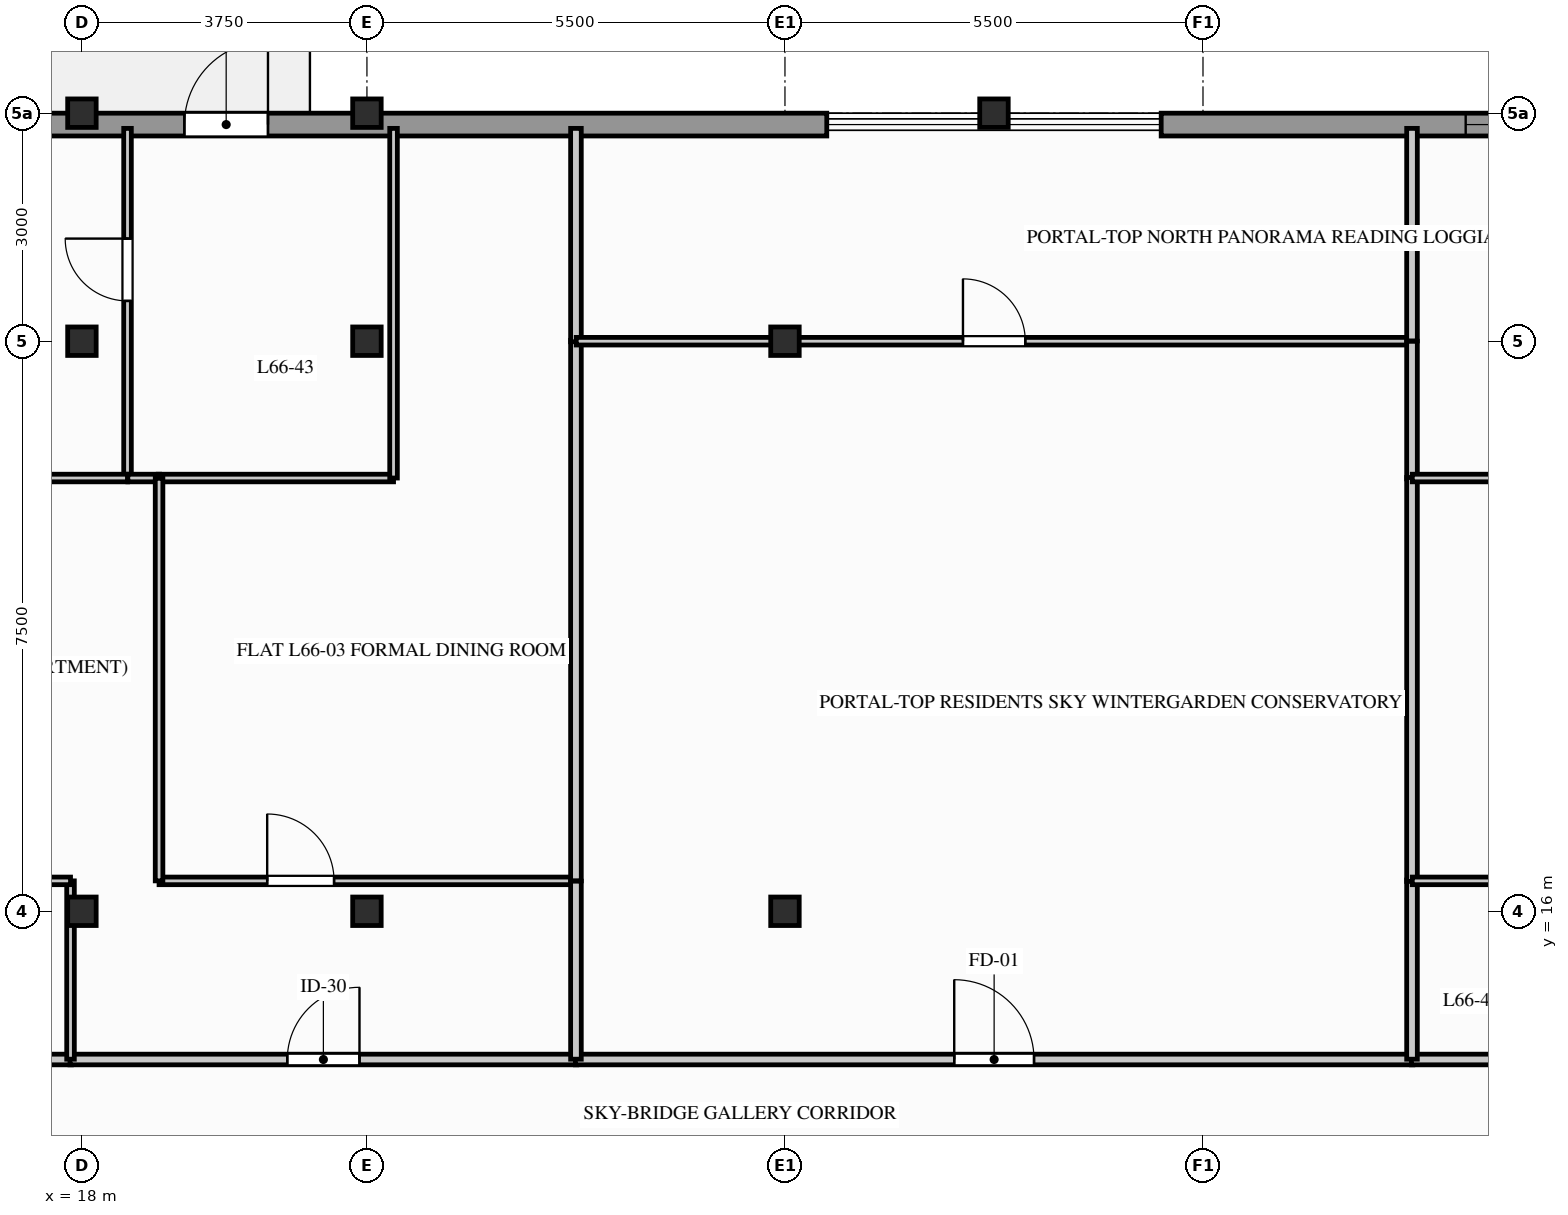
"""IFC4 building model, lengths in metres.
Left out: names, types, materials, properties, quantities, classifications, styles, units other than length and angle.
Written with IfcOpenShell. Run it as: python <this file> out.ifc"""

import sys

from ifc_helpers import new_model, si_unit, direction, frame, frame_2d, origin, origin_2d, place, context, subcontext, project, spatial, rectangle, i_section, extrude, element, fill, save


model = new_model("IFC4")
c1 = context("Model", 3, precision=1e-05, world=origin(), true_north=direction((0.0, 1.0)))
c2 = subcontext(c1, "Body", "Model", "MODEL_VIEW")
j1 = project(units=[si_unit("LENGTHUNIT", "METRE"), si_unit("PLANEANGLEUNIT", "RADIAN")], contexts=[c1])
p1 = place(None, origin())
s1 = spatial("IfcSite", under=j1, at=p1, CompositionType="ELEMENT")
p2 = place(p1, origin())
s2 = spatial("IfcBuilding", under=s1, at=p2, CompositionType="ELEMENT")
p3 = place(p2, frame((0.0, 0.0, 218.0)))
s3 = spatial("IfcBuildingStorey", under=s2, at=p3, CompositionType="ELEMENT", Elevation=218.0)
for number, where, z_axis, x_axis in (
    (1, (18.0, 16.0, 0.0), (0.0, 0.0, 1.0), (1.0, 0.0, 0.0)),
    (2, (18.0, 23.5, 0.0), (0.0, 0.0, 1.0), (1.0, 0.0, 0.0)),
    (3, (18.0, 26.5, 0.0), (0.0, 0.0, 1.0), (1.0, 0.0, 0.0)),
    (4, (21.75, 16.0, 0.0), (0.0, 0.0, 1.0), (1.0, 0.0, 0.0)),
    (5, (21.75, 23.5, 0.0), (0.0, 0.0, 1.0), (1.0, 0.0, 0.0)),
    (6, (21.75, 26.5, 0.0), (0.0, 0.0, 1.0), (1.0, 0.0, 0.0)),
    (7, (27.25, 16.0, 0.0), (0.0, 0.0, 1.0), (1.0, 0.0, 0.0)),
    (8, (27.25, 23.5, 0.0), (0.0, 0.0, 1.0), (1.0, 0.0, 0.0)),
    (9, (30.0, 26.5, 0.0), (0.0, 0.0, 1.0), (1.0, 0.0, 0.0)),
):
    element("IfcColumn", number, at=place(p3, frame(where, z_axis=z_axis, x_axis=x_axis)), inside=s3, PredefinedType="COLUMN", context=c2, shape_type="SweptSolid", body=[
        extrude(i_section(OverallWidth=0.375, OverallDepth=0.375, WebThickness=0.017, FlangeThickness=0.027, FilletRadius=0.015, at=origin_2d()), origin(), (0.0, 0.0, 1.0), 3.1),
    ])
p4 = place(p3, frame((11.45, 26.35, 0.0), z_axis=(0.0, 0.0, 1.0), x_axis=(1.0, 0.0, 0.0)))
e10 = element("IfcWall", 10, at=p4, inside=s3, PredefinedType="STANDARD", context=c2, shape_type="SweptSolid", body=[
    extrude(rectangle(XDim=16.35, YDim=0.3, at=frame_2d((8.175, 0.0))), origin(), (0.0, 0.0, 1.0), 2.332),
])
p5 = place(p4, frame((7.898, 0.0, 0.0)))
e11 = element("IfcOpeningElement", 11, at=p5, cuts=e10, PredefinedType="OPENING", context=c2, shape_type="SweptSolid", body=[
    extrude(rectangle(XDim=1.1, YDim=2.2, at=frame_2d((0.55, 1.1))), frame((0.0, 0.16, 0.0), z_axis=(0.0, -1.0, 0.0), x_axis=(1.0, 0.0, 0.0)), (0.0, 0.0, 1.0), 0.32),
])
p6 = place(p4, frame((1.8, 0.0, 0.512)))
e12 = element("IfcOpeningElement", 12, at=p6, cuts=e10, PredefinedType="OPENING", context=c2, shape_type="SweptSolid", body=[
    extrude(rectangle(XDim=1.2, YDim=1.6, at=frame_2d((0.6, 0.8))), frame((0.0, 0.16, 0.0), z_axis=(0.0, -1.0, 0.0), x_axis=(1.0, 0.0, 0.0)), (0.0, 0.0, 1.0), 0.32),
])
p7 = place(p4, frame((4.421, 0.0, 0.512)))
e13 = element("IfcOpeningElement", 13, at=p7, cuts=e10, PredefinedType="OPENING", context=c2, shape_type="SweptSolid", body=[
    extrude(rectangle(XDim=1.2, YDim=1.6, at=frame_2d((0.6, 0.8))), frame((0.0, 0.16, 0.0), z_axis=(0.0, -1.0, 0.0), x_axis=(1.0, 0.0, 0.0)), (0.0, 0.0, 1.0), 0.32),
])
p8 = place(p3, frame((32.2, 26.35, 0.0), z_axis=(0.0, 0.0, 1.0), x_axis=(1.0, 0.0, 0.0)))
e14 = element("IfcWall", 14, at=p8, inside=s3, PredefinedType="STANDARD", context=c2, shape_type="SweptSolid", body=[
    extrude(rectangle(XDim=16.35, YDim=0.3, at=frame_2d((8.175, 0.0))), origin(), (0.0, 0.0, 1.0), 2.332),
])
p9 = place(p8, frame((7.6, 0.0, 0.0)))
e15 = element("IfcOpeningElement", 15, at=p9, cuts=e14, PredefinedType="OPENING", context=c2, shape_type="SweptSolid", body=[
    extrude(rectangle(XDim=1.1, YDim=2.2, at=frame_2d((0.55, 1.1))), frame((0.0, 0.16, 0.0), z_axis=(0.0, -1.0, 0.0), x_axis=(1.0, 0.0, 0.0)), (0.0, 0.0, 1.0), 0.32),
])
p10 = place(p8, frame((11.5, 0.0, 0.512)))
e16 = element("IfcOpeningElement", 16, at=p10, cuts=e14, PredefinedType="OPENING", context=c2, shape_type="SweptSolid", body=[
    extrude(rectangle(XDim=1.2, YDim=1.6, at=frame_2d((0.6, 0.8))), frame((0.0, 0.16, 0.0), z_axis=(0.0, -1.0, 0.0), x_axis=(1.0, 0.0, 0.0)), (0.0, 0.0, 1.0), 0.32),
])
p11 = place(p8, frame((4.006, 0.0, 0.512)))
e17 = element("IfcOpeningElement", 17, at=p11, cuts=e14, PredefinedType="OPENING", context=c2, shape_type="SweptSolid", body=[
    extrude(rectangle(XDim=1.2, YDim=1.6, at=frame_2d((0.6, 0.8))), frame((0.0, 0.16, 0.0), z_axis=(0.0, -1.0, 0.0), x_axis=(1.0, 0.0, 0.0)), (0.0, 0.0, 1.0), 0.32),
])
p12 = place(p3, frame((14.643, 14.05, 0.0), z_axis=(0.0, 0.0, 1.0), x_axis=(1.0, 0.0, 0.0)))
e18 = element("IfcWall", 18, at=p12, inside=s3, PredefinedType="PARTITIONING", context=c2, shape_type="SweptSolid", body=[
    extrude(rectangle(XDim=3.219, YDim=0.14, at=frame_2d((1.609, 0.0))), origin(), (0.0, 0.0, 1.0), 2.89),
])
p13 = place(p3, frame((17.843, 14.05, 0.0), z_axis=(0.0, 0.0, 1.0), x_axis=(1.0, 0.0, 0.0)))
e19 = element("IfcWall", 19, at=p13, inside=s3, PredefinedType="PARTITIONING", context=c2, shape_type="SweptSolid", body=[
    extrude(rectangle(XDim=6.668, YDim=0.14, at=frame_2d((3.334, 0.0))), origin(), (0.0, 0.0, 1.0), 2.325),
])
p14 = place(p13, frame((2.859, 0.0, 0.0)))
e20 = element("IfcOpeningElement", 20, at=p14, cuts=e19, PredefinedType="OPENING", context=c2, shape_type="SweptSolid", body=[
    extrude(rectangle(XDim=0.95, YDim=2.05, at=frame_2d((0.475, 1.025))), frame((0.0, 0.08, 0.0), z_axis=(0.0, -1.0, 0.0), x_axis=(1.0, 0.0, 0.0)), (0.0, 0.0, 1.0), 0.16),
])
p15 = place(p3, frame((24.493, 14.05, 0.0), z_axis=(0.0, 0.0, 1.0), x_axis=(1.0, 0.0, 0.0)))
e21 = element("IfcWall", 21, at=p15, inside=s3, PredefinedType="PARTITIONING", context=c2, shape_type="SweptSolid", body=[
    extrude(rectangle(XDim=11.019, YDim=0.14, at=frame_2d((5.509, 0.0))), origin(), (0.0, 0.0, 1.0), 2.332),
])
p16 = place(p15, frame((4.984, 0.0, 0.0)))
e22 = element("IfcOpeningElement", 22, at=p16, cuts=e21, PredefinedType="OPENING", context=c2, shape_type="SweptSolid", body=[
    extrude(rectangle(XDim=1.05, YDim=2.06, at=frame_2d((0.525, 1.03))), frame((0.0, 0.08, 0.0), z_axis=(0.0, -1.0, 0.0), x_axis=(1.0, 0.0, 0.0)), (0.0, 0.0, 1.0), 0.16),
])
p17 = place(p3, frame((35.493, 14.05, 0.0), z_axis=(0.0, 0.0, 1.0), x_axis=(1.0, 0.0, 0.0)))
e23 = element("IfcWall", 23, at=p17, inside=s3, PredefinedType="PARTITIONING", context=c2, shape_type="SweptSolid", body=[
    extrude(rectangle(XDim=3.069, YDim=0.14, at=frame_2d((1.534, 0.0))), origin(), (0.0, 0.0, 1.0), 2.325),
])
p18 = place(p3, frame((17.85, 14.054, 0.0), z_axis=(0.0, 0.0, 1.0), x_axis=(0.0, 1.0, 0.0)))
e24 = element("IfcWall", 24, at=p18, inside=s3, PredefinedType="PARTITIONING", context=c2, shape_type="SweptSolid", body=[
    extrude(rectangle(XDim=2.346, YDim=0.1, at=frame_2d((1.173, 0.0))), origin(), (0.0, 0.0, 1.0), 2.325),
])
p19 = place(p3, frame((14.654, 16.4, 0.0), z_axis=(0.0, 0.0, 1.0), x_axis=(1.0, 0.0, 0.0)))
e25 = element("IfcWall", 25, at=p19, inside=s3, PredefinedType="PARTITIONING", context=c2, shape_type="SweptSolid", body=[
    extrude(rectangle(XDim=3.196, YDim=0.1, at=frame_2d((1.598, 0.0))), origin(), (0.0, 0.0, 1.0), 2.89),
])
p20 = place(p19, frame((1.158, 0.0, 0.0)))
e26 = element("IfcOpeningElement", 26, at=p20, cuts=e25, PredefinedType="OPENING", context=c2, shape_type="SweptSolid", body=[
    extrude(rectangle(XDim=0.88, YDim=2.04, at=frame_2d((0.44, 1.02))), frame((0.0, 0.06, 0.0), z_axis=(0.0, -1.0, 0.0), x_axis=(1.0, 0.0, 0.0)), (0.0, 0.0, 1.0), 0.12),
])
p21 = place(p3, frame((18.6, 21.7, 0.0), z_axis=(0.0, 0.0, 1.0), x_axis=(0.0, 1.0, 0.0)))
e27 = element("IfcWall", 27, at=p21, inside=s3, PredefinedType="PARTITIONING", context=c2, shape_type="SweptSolid", body=[
    extrude(rectangle(XDim=4.6, YDim=0.1, at=frame_2d((2.3, 0.0))), origin(), (0.0, 0.0, 1.0), 2.325),
])
p22 = place(p21, frame((2.33, 0.0, 0.0)))
e28 = element("IfcOpeningElement", 28, at=p22, cuts=e27, PredefinedType="OPENING", context=c2, shape_type="SweptSolid", body=[
    extrude(rectangle(XDim=0.82, YDim=2.02, at=frame_2d((0.41, 1.01))), frame((0.0, 0.06, 0.0), z_axis=(0.0, -1.0, 0.0), x_axis=(1.0, 0.0, 0.0)), (0.0, 0.0, 1.0), 0.12),
])
p23 = place(p3, frame((15.104, 21.7, 0.0), z_axis=(0.0, 0.0, 1.0), x_axis=(1.0, 0.0, 0.0)))
e29 = element("IfcWall", 29, at=p23, inside=s3, PredefinedType="PARTITIONING", context=c2, shape_type="SweptSolid", body=[
    extrude(rectangle(XDim=3.496, YDim=0.1, at=frame_2d((1.748, 0.0))), origin(), (0.0, 0.0, 1.0), 2.325),
])
p24 = place(p23, frame((1.308, 0.0, 0.0)))
e30 = element("IfcOpeningElement", 30, at=p24, cuts=e29, PredefinedType="OPENING", context=c2, shape_type="SweptSolid", body=[
    extrude(rectangle(XDim=0.88, YDim=2.04, at=frame_2d((0.44, 1.02))), frame((0.0, 0.06, 0.0), z_axis=(0.0, -1.0, 0.0), x_axis=(1.0, 0.0, 0.0)), (0.0, 0.0, 1.0), 0.12),
])
p25 = place(p3, frame((19.004, 21.7, 0.0), z_axis=(0.0, 0.0, 1.0), x_axis=(1.0, 0.0, 0.0)))
e31 = element("IfcWall", 31, at=p25, inside=s3, PredefinedType="PARTITIONING", context=c2, shape_type="SweptSolid", body=[
    extrude(rectangle(XDim=3.096, YDim=0.1, at=frame_2d((1.548, 0.0))), origin(), (0.0, 0.0, 1.0), 2.325),
])
p26 = place(p3, frame((22.1, 21.7, 0.0), z_axis=(0.0, 0.0, 1.0), x_axis=(0.0, 1.0, 0.0)))
e32 = element("IfcWall", 32, at=p26, inside=s3, PredefinedType="PARTITIONING", context=c2, shape_type="SweptSolid", body=[
    extrude(rectangle(XDim=4.6, YDim=0.1, at=frame_2d((2.3, 0.0))), origin(), (0.0, 0.0, 1.0), 2.325),
])
p27 = place(p3, frame((18.604, 21.7, 0.0), z_axis=(0.0, 0.0, 1.0), x_axis=(1.0, 0.0, 0.0)))
e33 = element("IfcWall", 33, at=p27, inside=s3, PredefinedType="PARTITIONING", context=c2, shape_type="SweptSolid", body=[
    extrude(rectangle(XDim=0.418, YDim=0.1, at=frame_2d((0.209, 0.0))), origin(), (0.0, 0.0, 1.0), 2.89),
])
p28 = place(p3, frame((19.015, 16.4, 0.0), z_axis=(0.0, 0.0, 1.0), x_axis=(1.0, 0.0, 0.0)))
e34 = element("IfcWall", 34, at=p28, inside=s3, PredefinedType="PARTITIONING", context=c2, shape_type="SweptSolid", body=[
    extrude(rectangle(XDim=5.485, YDim=0.1, at=frame_2d((2.743, 0.0))), origin(), (0.0, 0.0, 1.0), 2.325),
])
p29 = place(p28, frame((1.423, 0.0, 0.0)))
e35 = element("IfcOpeningElement", 35, at=p29, cuts=e34, PredefinedType="OPENING", context=c2, shape_type="SweptSolid", body=[
    extrude(rectangle(XDim=0.88, YDim=2.04, at=frame_2d((0.44, 1.02))), frame((0.0, 0.06, 0.0), z_axis=(0.0, -1.0, 0.0), x_axis=(1.0, 0.0, 0.0)), (0.0, 0.0, 1.0), 0.12),
])
p30 = place(p3, frame((19.015, 16.4, 0.0), z_axis=(0.0, 0.0, 1.0), x_axis=(0.0, 1.0, 0.0)))
e36 = element("IfcWall", 36, at=p30, inside=s3, PredefinedType="PARTITIONING", context=c2, shape_type="SweptSolid", body=[
    extrude(rectangle(XDim=5.296, YDim=0.1, at=frame_2d((2.648, 0.0))), origin(), (0.0, 0.0, 1.0), 2.614),
])
p31 = place(p3, frame((24.5, 16.4, 0.0), z_axis=(0.0, 0.0, 1.0), x_axis=(0.0, 1.0, 0.0)))
e37 = element("IfcWall", 37, at=p31, inside=s3, PredefinedType="PARTITIONING", context=c2, shape_type="SweptSolid", body=[
    extrude(rectangle(XDim=7.111, YDim=0.14, at=frame_2d((3.556, 0.0))), origin(), (0.0, 0.0, 1.0), 2.325),
])
p32 = place(p3, frame((24.5, 23.493, 0.0), z_axis=(0.0, 0.0, 1.0), x_axis=(0.0, 1.0, 0.0)))
e38 = element("IfcWall", 38, at=p32, inside=s3, PredefinedType="PARTITIONING", context=c2, shape_type="SweptSolid", body=[
    extrude(rectangle(XDim=2.807, YDim=0.14, at=frame_2d((1.404, 0.0))), origin(), (0.0, 0.0, 1.0), 2.325),
])
p33 = place(p3, frame((24.5, 14.054, 0.0), z_axis=(0.0, 0.0, 1.0), x_axis=(0.0, 1.0, 0.0)))
e39 = element("IfcWall", 39, at=p33, inside=s3, PredefinedType="PARTITIONING", context=c2, shape_type="SweptSolid", body=[
    extrude(rectangle(XDim=2.342, YDim=0.14, at=frame_2d((1.171, 0.0))), origin(), (0.0, 0.0, 1.0), 2.325),
])
p34 = place(p3, frame((24.504, 23.5, 0.0), z_axis=(0.0, 0.0, 1.0), x_axis=(1.0, 0.0, 0.0)))
e40 = element("IfcWall", 40, at=p34, inside=s3, PredefinedType="PARTITIONING", context=c2, shape_type="SweptSolid", body=[
    extrude(rectangle(XDim=10.996, YDim=0.1, at=frame_2d((5.498, 0.0))), origin(), (0.0, 0.0, 1.0), 2.325),
])
p35 = place(p34, frame((5.088, 0.0, 0.0)))
e41 = element("IfcOpeningElement", 41, at=p35, cuts=e40, PredefinedType="OPENING", context=c2, shape_type="SweptSolid", body=[
    extrude(rectangle(XDim=0.82, YDim=2.02, at=frame_2d((0.41, 1.01))), frame((0.0, 0.06, 0.0), z_axis=(0.0, -1.0, 0.0), x_axis=(1.0, 0.0, 0.0)), (0.0, 0.0, 1.0), 0.12),
])
p36 = place(p3, frame((35.5, 14.054, 0.0), z_axis=(0.0, 0.0, 1.0), x_axis=(0.0, 1.0, 0.0)))
e42 = element("IfcWall", 42, at=p36, inside=s3, PredefinedType="PARTITIONING", context=c2, shape_type="SweptSolid", body=[
    extrude(rectangle(XDim=2.357, YDim=0.14, at=frame_2d((1.179, 0.0))), origin(), (0.0, 0.0, 1.0), 2.325),
])
p37 = place(p3, frame((35.5, 21.689, 0.0), z_axis=(0.0, 0.0, 1.0), x_axis=(0.0, 1.0, 0.0)))
e43 = element("IfcWall", 43, at=p37, inside=s3, PredefinedType="PARTITIONING", context=c2, shape_type="SweptSolid", body=[
    extrude(rectangle(XDim=1.811, YDim=0.14, at=frame_2d((0.906, 0.0))), origin(), (0.0, 0.0, 1.0), 2.325),
])
p38 = place(p3, frame((35.5, 16.393, 0.0), z_axis=(0.0, 0.0, 1.0), x_axis=(0.0, 1.0, 0.0)))
e44 = element("IfcWall", 44, at=p38, inside=s3, PredefinedType="PARTITIONING", context=c2, shape_type="SweptSolid", body=[
    extrude(rectangle(XDim=5.315, YDim=0.14, at=frame_2d((2.657, 0.0))), origin(), (0.0, 0.0, 1.0), 2.614),
])
p39 = place(p3, frame((35.5, 23.504, 0.0), z_axis=(0.0, 0.0, 1.0), x_axis=(0.0, 1.0, 0.0)))
e45 = element("IfcWall", 45, at=p39, inside=s3, PredefinedType="PARTITIONING", context=c2, shape_type="SweptSolid", body=[
    extrude(rectangle(XDim=2.796, YDim=0.14, at=frame_2d((1.398, 0.0))), origin(), (0.0, 0.0, 1.0), 2.325),
])
p40 = place(p3, frame((35.504, 16.4, 0.0), z_axis=(0.0, 0.0, 1.0), x_axis=(1.0, 0.0, 0.0)))
e46 = element("IfcWall", 46, at=p40, inside=s3, PredefinedType="PARTITIONING", context=c2, shape_type="SweptSolid", body=[
    extrude(rectangle(XDim=3.046, YDim=0.1, at=frame_2d((1.523, 0.0))), origin(), (0.0, 0.0, 1.0), 2.325),
])
p41 = place(p40, frame((1.113, 0.0, 0.0)))
e47 = element("IfcOpeningElement", 47, at=p41, cuts=e46, PredefinedType="OPENING", context=c2, shape_type="SweptSolid", body=[
    extrude(rectangle(XDim=0.82, YDim=2.02, at=frame_2d((0.41, 1.01))), frame((0.0, 0.06, 0.0), z_axis=(0.0, -1.0, 0.0), x_axis=(1.0, 0.0, 0.0)), (0.0, 0.0, 1.0), 0.12),
])
p42 = place(p3, frame((35.504, 21.7, 0.0), z_axis=(0.0, 0.0, 1.0), x_axis=(1.0, 0.0, 0.0)))
e48 = element("IfcWall", 48, at=p42, inside=s3, PredefinedType="PARTITIONING", context=c2, shape_type="SweptSolid", body=[
    extrude(rectangle(XDim=3.363, YDim=0.1, at=frame_2d((1.682, 0.0))), origin(), (0.0, 0.0, 1.0), 2.325),
])
p43 = place(p42, frame((1.241, 0.0, 0.0)))
e49 = element("IfcOpeningElement", 49, at=p43, cuts=e48, PredefinedType="OPENING", context=c2, shape_type="SweptSolid", body=[
    extrude(rectangle(XDim=0.88, YDim=2.04, at=frame_2d((0.44, 1.02))), frame((0.0, 0.06, 0.0), z_axis=(0.0, -1.0, 0.0), x_axis=(1.0, 0.0, 0.0)), (0.0, 0.0, 1.0), 0.12),
])
p44 = place(p5, origin())
e50 = element("IfcDoor", 50, at=p44, inside=s3, OperationType="SINGLE_SWING_RIGHT", PredefinedType="DOOR", context=c2, shape_type="SweptSolid", body=[
    extrude(rectangle(XDim=1.1, YDim=2.2, at=frame_2d((0.55, 1.1))), frame((0.0, 0.025, 0.0), z_axis=(0.0, -1.0, 0.0), x_axis=(1.0, 0.0, 0.0)), (0.0, 0.0, 1.0), 0.05),
])
fill(e11, e50)
p45 = place(p14, origin())
e51 = element("IfcDoor", 51, at=p45, inside=s3, OperationType="SINGLE_SWING_RIGHT", PredefinedType="DOOR", context=c2, shape_type="SweptSolid", body=[
    extrude(rectangle(XDim=0.95, YDim=2.05, at=frame_2d((0.475, 1.025))), frame((0.0, 0.025, 0.0), z_axis=(0.0, -1.0, 0.0), x_axis=(1.0, 0.0, 0.0)), (0.0, 0.0, 1.0), 0.05),
])
fill(e20, e51)
p46 = place(p16, origin())
e52 = element("IfcDoor", 52, at=p46, inside=s3, OperationType="SINGLE_SWING_LEFT", PredefinedType="DOOR", context=c2, shape_type="SweptSolid", body=[
    extrude(rectangle(XDim=1.05, YDim=2.06, at=frame_2d((0.525, 1.03))), frame((0.0, 0.025, 0.0), z_axis=(0.0, -1.0, 0.0), x_axis=(1.0, 0.0, 0.0)), (0.0, 0.0, 1.0), 0.05),
])
fill(e22, e52)
p47 = place(p29, origin())
e53 = element("IfcDoor", 53, at=p47, inside=s3, OperationType="SINGLE_SWING_LEFT", PredefinedType="DOOR", context=c2, shape_type="SweptSolid", body=[
    extrude(rectangle(XDim=0.88, YDim=2.04, at=frame_2d((0.44, 1.02))), frame((0.0, 0.025, 0.0), z_axis=(0.0, -1.0, 0.0), x_axis=(1.0, 0.0, 0.0)), (0.0, 0.0, 1.0), 0.05),
])
fill(e35, e53)
p48 = place(p22, origin())
e54 = element("IfcDoor", 54, at=p48, inside=s3, OperationType="SINGLE_SWING_RIGHT", PredefinedType="DOOR", context=c2, shape_type="SweptSolid", body=[
    extrude(rectangle(XDim=0.82, YDim=2.02, at=frame_2d((0.41, 1.01))), frame((0.0, 0.025, 0.0), z_axis=(0.0, -1.0, 0.0), x_axis=(1.0, 0.0, 0.0)), (0.0, 0.0, 1.0), 0.05),
])
fill(e28, e54)
p49 = place(p35, origin())
e55 = element("IfcDoor", 55, at=p49, inside=s3, OperationType="SINGLE_SWING_LEFT", PredefinedType="DOOR", context=c2, shape_type="SweptSolid", body=[
    extrude(rectangle(XDim=0.82, YDim=2.02, at=frame_2d((0.41, 1.01))), frame((0.0, 0.025, 0.0), z_axis=(0.0, -1.0, 0.0), x_axis=(1.0, 0.0, 0.0)), (0.0, 0.0, 1.0), 0.05),
])
fill(e41, e55)
p50 = place(p11, origin())
e56 = element("IfcWindow", 56, at=p50, inside=s3, PartitioningType="SINGLE_PANEL", PredefinedType="WINDOW", context=c2, shape_type="SweptSolid", body=[
    extrude(rectangle(XDim=1.2, YDim=1.6, at=frame_2d((0.6, 0.8))), frame((0.0, 0.03, 0.0), z_axis=(0.0, -1.0, 0.0), x_axis=(1.0, 0.0, 0.0)), (0.0, 0.0, 1.0), 0.06),
])
fill(e17, e56)
save(model, sys.argv[1])
